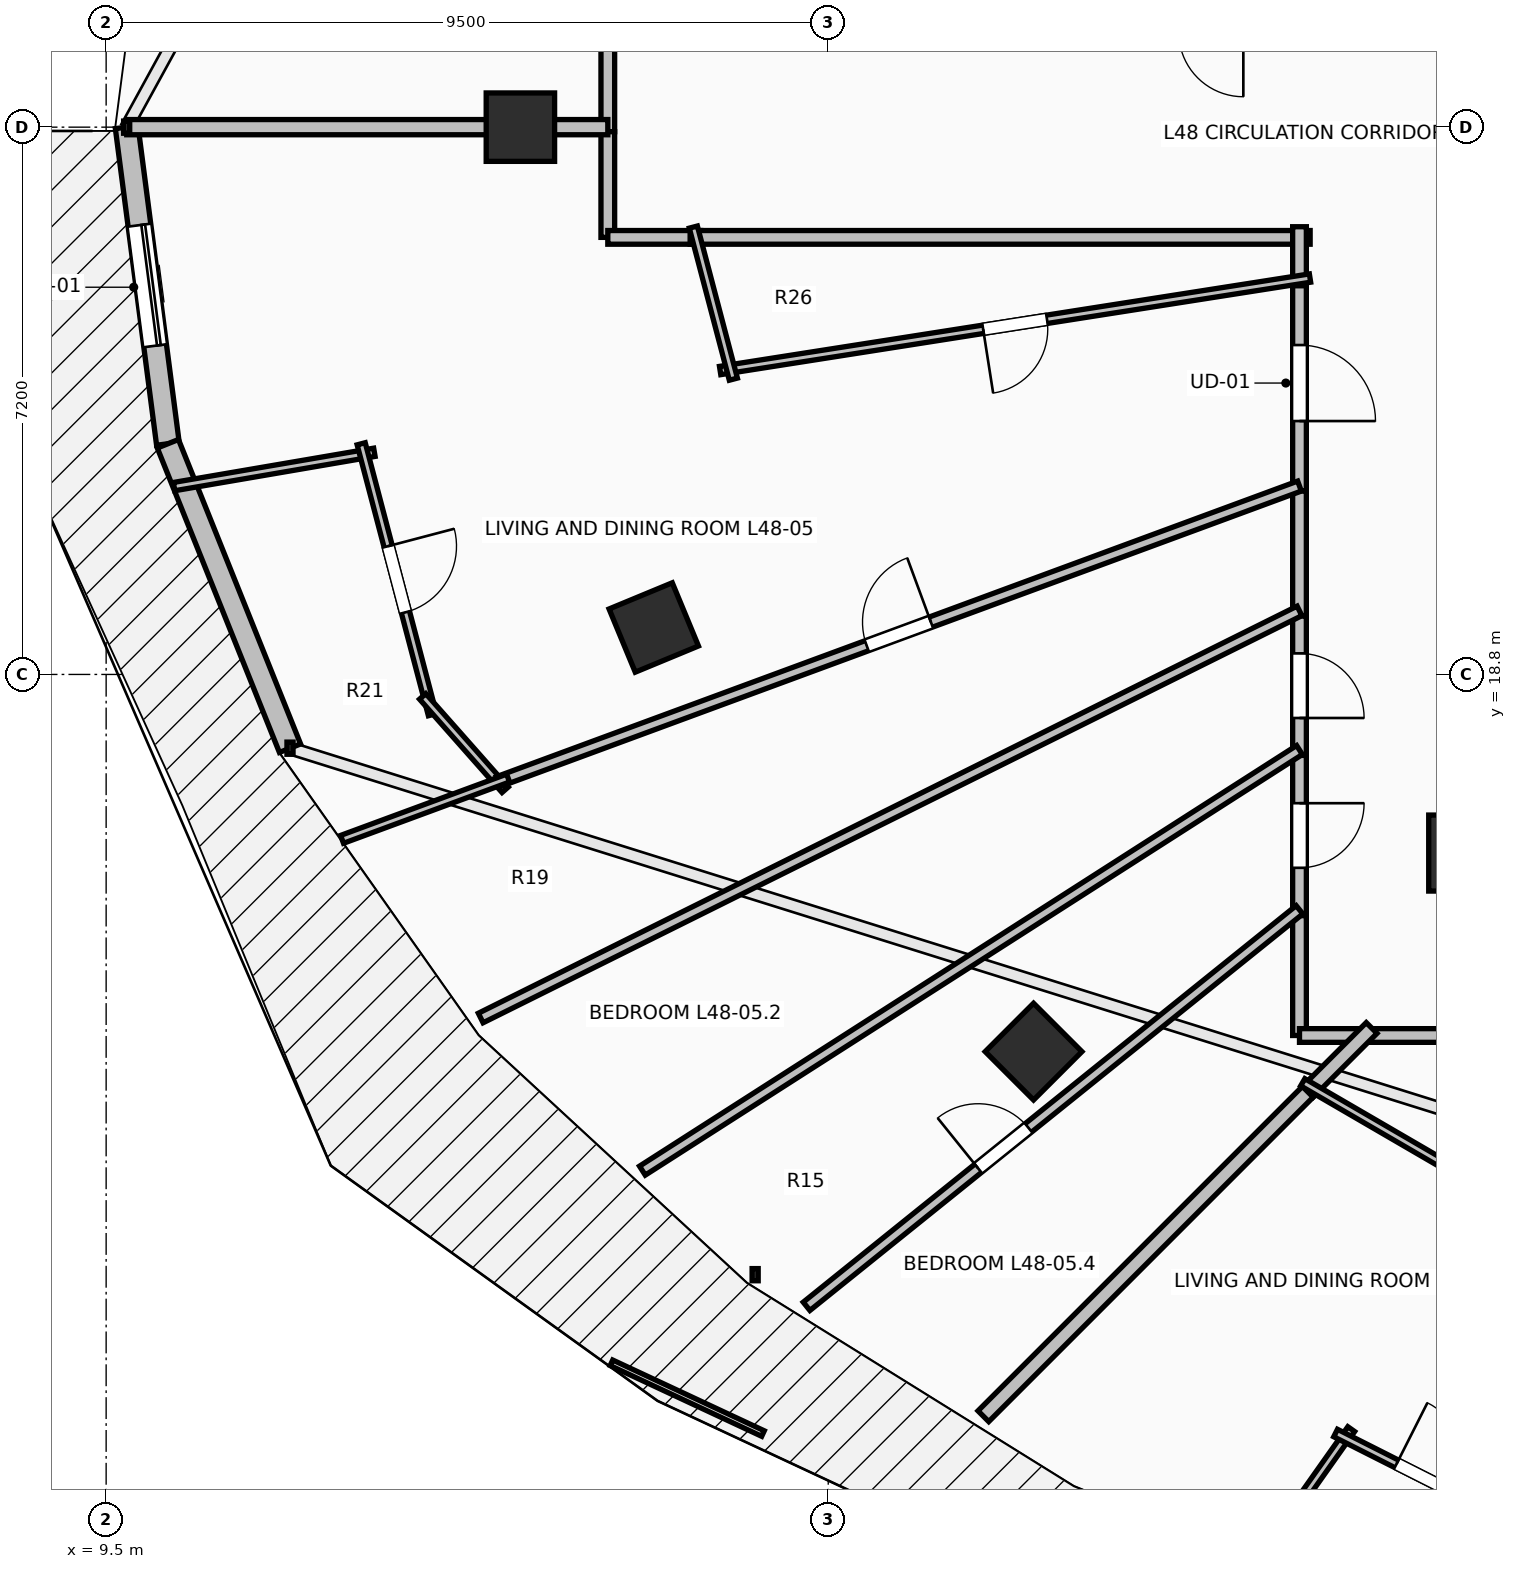
"""IFC4 building model, lengths in metres.
Left out: names, types, materials, properties, quantities, classifications, styles, units other than length and angle.
Written with IfcOpenShell. Run it as: python <this file> out.ifc"""

import sys

from ifc_helpers import new_model, si_unit, direction, frame, frame_2d, origin, origin_2d, place, context, subcontext, project, spatial, rectangle, extrude, element, fill, save


model = new_model("IFC4")
c1 = context("Model", 3, precision=1e-05, world=origin(), true_north=direction((0.0, 1.0)))
c2 = subcontext(c1, "Body", "Model", "MODEL_VIEW")
j1 = project(units=[si_unit("LENGTHUNIT", "METRE"), si_unit("PLANEANGLEUNIT", "RADIAN")], contexts=[c1])
p1 = place(None, origin())
s1 = spatial("IfcSite", under=j1, at=p1, CompositionType="ELEMENT")
p2 = place(p1, origin())
s2 = spatial("IfcBuilding", under=s1, at=p2, CompositionType="ELEMENT")
p3 = place(p2, frame((0.0, 0.0, 179.1)))
s3 = spatial("IfcBuildingStorey", under=s2, at=p3, CompositionType="ELEMENT", Elevation=179.1)
for number, where, z_axis, x_axis in (
    (1, (14.95, 26.0, 0.0), (0.0, 0.0, 1.0), (-1.0, 0.0, 0.0)),
    (2, (16.705, 19.418, 0.0), (0.0, 0.0, 1.0), (-0.924, -0.383, 0.0)),
    (3, (21.701, 13.838, 0.0), (0.0, 0.0, 1.0), (-0.707, -0.707, 0.0)),
):
    element("IfcColumn", number, at=place(p3, frame(where, z_axis=z_axis, x_axis=x_axis)), inside=s3, PredefinedType="COLUMN", context=c2, shape_type="SweptSolid", body=[
        extrude(rectangle(XDim=0.9, YDim=0.9, at=origin_2d()), origin(), (0.0, 0.0, 1.0), 3.5),
    ])
p4 = place(p3, frame((27.25, 16.45, 0.0), z_axis=(0.0, 0.0, 1.0), x_axis=(1.0, 0.0, 0.0)))
e4 = element("IfcColumn", 4, at=p4, inside=s3, PredefinedType="PILASTER", context=c2, shape_type="SweptSolid", body=[
    extrude(rectangle(XDim=0.7, YDim=1.0, at=origin_2d()), origin(), (0.0, 0.0, 1.0), 3.5),
])
p5 = place(p3, frame((9.77, 26.0, 0.0), z_axis=(0.0, 0.0, 1.0), x_axis=(0.129147853268, -0.991625348605, 0.0)))
e5 = element("IfcWall", 5, at=p5, inside=s3, PredefinedType="STANDARD", context=c2, shape_type="SweptSolid", body=[
    extrude(rectangle(XDim=4.2, YDim=0.3, at=frame_2d((2.1, 0.0))), origin(), (0.0, 0.0, 1.0), 3.24),
])
p6 = place(p5, frame((1.3, 0.0, 0.0)))
e6 = element("IfcOpeningElement", 6, at=p6, cuts=e5, PredefinedType="OPENING", context=c2, shape_type="SweptSolid", body=[
    extrude(rectangle(XDim=1.6, YDim=2.3, at=frame_2d((0.8, 1.15))), frame((0.0, 0.165, 0.0), z_axis=(0.0, -1.0, 0.0), x_axis=(1.0, 0.0, 0.0)), (0.0, 0.0, 1.0), 0.33),
])
p7 = place(p3, frame((10.312, 21.835, 0.0), z_axis=(0.0, 0.0, 1.0), x_axis=(0.372268409848, -0.928125116043, 0.0)))
e7 = element("IfcWall", 7, at=p7, inside=s3, PredefinedType="STANDARD", context=c2, shape_type="SweptSolid", body=[
    extrude(rectangle(XDim=4.315, YDim=0.3, at=frame_2d((2.158, 0.0))), origin(), (0.0, 0.0, 1.0), 3.24),
])
p8 = place(p3, frame((16.1, 27.25, 0.0), z_axis=(0.0, 0.0, 1.0), x_axis=(0.0, -1.0, 0.0)))
e8 = element("IfcWall", 8, at=p8, inside=s3, PredefinedType="PARTITIONING", context=c2, shape_type="SweptSolid", body=[
    extrude(rectangle(XDim=1.31, YDim=0.18, at=frame_2d((0.655, 0.0))), origin(), (0.0, 0.0, 1.0), 2.432),
])
p9 = place(p3, frame((16.1, 25.94, 0.0), z_axis=(0.0, 0.0, 1.0), x_axis=(0.0, -1.0, 0.0)))
e9 = element("IfcWall", 9, at=p9, inside=s3, PredefinedType="PARTITIONING", context=c2, shape_type="SweptSolid", body=[
    extrude(rectangle(XDim=1.39, YDim=0.18, at=frame_2d((0.695, 0.0))), origin(), (0.0, 0.0, 1.0), 2.432),
])
p10 = place(p3, frame((16.1, 24.55, 0.0), z_axis=(0.0, 0.0, 1.0), x_axis=(1.0, 0.0, 0.0)))
e10 = element("IfcWall", 10, at=p10, inside=s3, PredefinedType="PARTITIONING", context=c2, shape_type="SweptSolid", body=[
    extrude(rectangle(XDim=1.223, YDim=0.18, at=frame_2d((0.611, 0.0))), origin(), (0.0, 0.0, 1.0), 3.24),
])
p11 = place(p3, frame((25.2, 24.053, 0.0), z_axis=(0.0, 0.0, 1.0), x_axis=(0.0, -1.0, 0.0)))
e11 = element("IfcWall", 11, at=p11, inside=s3, PredefinedType="PARTITIONING", context=c2, shape_type="SweptSolid", body=[
    extrude(rectangle(XDim=2.839, YDim=0.18, at=frame_2d((1.419, 0.0))), origin(), (0.0, 0.0, 1.0), 3.24),
])
p12 = place(p11, frame((0.919, 0.0, 0.0)))
e12 = element("IfcOpeningElement", 12, at=p12, cuts=e11, PredefinedType="OPENING", context=c2, shape_type="SweptSolid", body=[
    extrude(rectangle(XDim=1.0, YDim=2.15, at=frame_2d((0.5, 1.075))), frame((0.0, 0.105, 0.0), z_axis=(0.0, -1.0, 0.0), x_axis=(1.0, 0.0, 0.0)), (0.0, 0.0, 1.0), 0.21),
])
p13 = place(p3, frame((17.183, 24.55, 0.0), z_axis=(0.0, 0.0, 1.0), x_axis=(1.0, 0.0, 0.0)))
e13 = element("IfcWall", 13, at=p13, inside=s3, PredefinedType="PARTITIONING", context=c2, shape_type="SweptSolid", body=[
    extrude(rectangle(XDim=8.157, YDim=0.18, at=frame_2d((4.079, 0.0))), origin(), (0.0, 0.0, 1.0), 2.874),
])
p14 = place(p3, frame((25.2, 24.69, 0.0), z_axis=(0.0, 0.0, 1.0), x_axis=(0.0, -1.0, 0.0)))
e14 = element("IfcWall", 14, at=p14, inside=s3, PredefinedType="PARTITIONING", context=c2, shape_type="SweptSolid", body=[
    extrude(rectangle(XDim=0.777, YDim=0.18, at=frame_2d((0.388, 0.0))), origin(), (0.0, 0.0, 1.0), 3.24),
])
p15 = place(p3, frame((25.2, 21.214, 0.0), z_axis=(0.0, 0.0, 1.0), x_axis=(0.0, -1.0, 0.0)))
e15 = element("IfcWall", 15, at=p15, inside=s3, PredefinedType="PARTITIONING", context=c2, shape_type="SweptSolid", body=[
    extrude(rectangle(XDim=1.645, YDim=0.18, at=frame_2d((0.823, 0.0))), origin(), (0.0, 0.0, 1.0), 3.24),
])
p16 = place(p3, frame((25.2, 19.569, 0.0), z_axis=(0.0, 0.0, 1.0), x_axis=(0.0, -1.0, 0.0)))
e16 = element("IfcWall", 16, at=p16, inside=s3, PredefinedType="PARTITIONING", context=c2, shape_type="SweptSolid", body=[
    extrude(rectangle(XDim=1.834, YDim=0.18, at=frame_2d((0.917, 0.0))), origin(), (0.0, 0.0, 1.0), 3.24),
])
p17 = place(p16, frame((0.492, 0.0, 0.0)))
e17 = element("IfcOpeningElement", 17, at=p17, cuts=e16, PredefinedType="OPENING", context=c2, shape_type="SweptSolid", body=[
    extrude(rectangle(XDim=0.85, YDim=2.1, at=frame_2d((0.425, 1.05))), frame((0.0, 0.105, 0.0), z_axis=(0.0, -1.0, 0.0), x_axis=(1.0, 0.0, 0.0)), (0.0, 0.0, 1.0), 0.21),
])
p18 = place(p3, frame((25.2, 17.735, 0.0), z_axis=(0.0, 0.0, 1.0), x_axis=(0.0, -1.0, 0.0)))
e18 = element("IfcWall", 18, at=p18, inside=s3, PredefinedType="PARTITIONING", context=c2, shape_type="SweptSolid", body=[
    extrude(rectangle(XDim=2.108, YDim=0.18, at=frame_2d((1.054, 0.0))), origin(), (0.0, 0.0, 1.0), 2.432),
])
p19 = place(p18, frame((0.629, 0.0, 0.0)))
e19 = element("IfcOpeningElement", 19, at=p19, cuts=e18, PredefinedType="OPENING", context=c2, shape_type="SweptSolid", body=[
    extrude(rectangle(XDim=0.85, YDim=2.1, at=frame_2d((0.425, 1.05))), frame((0.0, 0.105, 0.0), z_axis=(0.0, -1.0, 0.0), x_axis=(1.0, 0.0, 0.0)), (0.0, 0.0, 1.0), 0.21),
])
p20 = place(p3, frame((25.2, 15.627, 0.0), z_axis=(0.0, 0.0, 1.0), x_axis=(0.0, -1.0, 0.0)))
e20 = element("IfcWall", 20, at=p20, inside=s3, PredefinedType="PARTITIONING", context=c2, shape_type="SweptSolid", body=[
    extrude(rectangle(XDim=1.577, YDim=0.18, at=frame_2d((0.789, 0.0))), origin(), (0.0, 0.0, 1.0), 2.432),
])
p21 = place(p3, frame((25.2, 14.05, 0.0), z_axis=(0.0, 0.0, 1.0), x_axis=(1.0, 0.0, 0.0)))
e21 = element("IfcWall", 21, at=p21, inside=s3, PredefinedType="PARTITIONING", context=c2, shape_type="SweptSolid", body=[
    extrude(rectangle(XDim=0.91, YDim=0.18, at=frame_2d((0.455, 0.0))), origin(), (0.0, 0.0, 1.0), 2.874),
])
p22 = place(p3, frame((25.97, 14.05, 0.0), z_axis=(0.0, 0.0, 1.0), x_axis=(1.0, 0.0, 0.0)))
e22 = element("IfcWall", 22, at=p22, inside=s3, PredefinedType="PARTITIONING", context=c2, shape_type="SweptSolid", body=[
    extrude(rectangle(XDim=3.385, YDim=0.18, at=frame_2d((1.692, 0.0))), origin(), (0.0, 0.0, 1.0), 2.432),
])
p23 = place(p3, frame((9.771, 26.0, 0.0), z_axis=(0.0, 0.0, 1.0), x_axis=(1.0, 0.0, 0.0)))
e23 = element("IfcWall", 23, at=p23, inside=s3, PredefinedType="PARTITIONING", context=c2, shape_type="SweptSolid", body=[
    extrude(rectangle(XDim=6.329, YDim=0.2, at=frame_2d((3.165, 0.0))), origin(), (0.0, 0.0, 1.0), 2.432),
])
p24 = place(p3, frame((25.338, 24.015, 0.0), z_axis=(0.0, 0.0, 1.0), x_axis=(-0.987940229144, -0.154835731144, 0.0)))
e24 = element("IfcWall", 24, at=p24, inside=s3, PredefinedType="PARTITIONING", context=c2, shape_type="SweptSolid", body=[
    extrude(rectangle(XDim=7.855, YDim=0.11, at=frame_2d((3.928, 0.0))), origin(), (0.0, 0.0, 1.0), 2.874),
])
p25 = place(p24, frame((3.503, 0.0, 0.0)))
e25 = element("IfcOpeningElement", 25, at=p25, cuts=e24, PredefinedType="OPENING", context=c2, shape_type="SweptSolid", body=[
    extrude(rectangle(XDim=0.85, YDim=2.1, at=frame_2d((0.425, 1.05))), frame((0.0, 0.07, 0.0), z_axis=(0.0, -1.0, 0.0), x_axis=(1.0, 0.0, 0.0)), (0.0, 0.0, 1.0), 0.14),
])
p26 = place(p3, frame((17.752, 22.685, 0.0), z_axis=(0.0, 0.0, 1.0), x_axis=(-0.254429402158, 0.967091350038, 0.0)))
e26 = element("IfcWall", 26, at=p26, inside=s3, PredefinedType="PARTITIONING", context=c2, shape_type="SweptSolid", body=[
    extrude(rectangle(XDim=2.069, YDim=0.11, at=frame_2d((1.034, 0.0))), origin(), (0.0, 0.0, 1.0), 3.24),
])
p27 = place(p3, frame((10.394, 21.271, 0.0), z_axis=(0.0, 0.0, 1.0), x_axis=(0.985656128296, 0.168766100722, 0.0)))
e27 = element("IfcWall", 27, at=p27, inside=s3, PredefinedType="PARTITIONING", context=c2, shape_type="SweptSolid", body=[
    extrude(rectangle(XDim=2.673, YDim=0.11, at=frame_2d((1.337, 0.0))), origin(), (0.0, 0.0, 1.0), 3.24),
])
p28 = place(p3, frame((12.855, 21.834, 0.0), z_axis=(0.0, 0.0, 1.0), x_axis=(0.254271540361, -0.967132867688, 0.0)))
e28 = element("IfcWall", 28, at=p28, inside=s3, PredefinedType="PARTITIONING", context=c2, shape_type="SweptSolid", body=[
    extrude(rectangle(XDim=3.685, YDim=0.11, at=frame_2d((1.843, 0.0))), origin(), (0.0, 0.0, 1.0), 3.24),
])
p29 = place(p28, frame((1.393, 0.0, 0.0)))
e29 = element("IfcOpeningElement", 29, at=p29, cuts=e28, PredefinedType="OPENING", context=c2, shape_type="SweptSolid", body=[
    extrude(rectangle(XDim=0.9, YDim=2.1, at=frame_2d((0.45, 1.05))), frame((0.0, 0.07, 0.0), z_axis=(0.0, -1.0, 0.0), x_axis=(1.0, 0.0, 0.0)), (0.0, 0.0, 1.0), 0.14),
])
p30 = place(p3, frame((13.664, 18.511, 0.0), z_axis=(0.0, 0.0, 1.0), x_axis=(0.662345628205, -0.749198417509, 0.0)))
e30 = element("IfcWall", 30, at=p30, inside=s3, PredefinedType="PARTITIONING", context=c2, shape_type="SweptSolid", body=[
    extrude(rectangle(XDim=1.639, YDim=0.11, at=frame_2d((0.819, 0.0))), origin(), (0.0, 0.0, 1.0), 3.24),
])
p31 = place(p3, frame((14.657, 17.388, 0.0), z_axis=(0.0, 0.0, 1.0), x_axis=(0.938173124492, 0.346166417322, 0.0)))
e31 = element("IfcWall", 31, at=p31, inside=s3, PredefinedType="PARTITIONING", context=c2, shape_type="SweptSolid", body=[
    extrude(rectangle(XDim=11.238, YDim=0.14, at=frame_2d((5.619, 0.0))), origin(), (0.0, 0.0, 1.0), 2.432),
])
p32 = place(p31, frame((5.169, 0.0, 0.0)))
e32 = element("IfcOpeningElement", 32, at=p32, cuts=e31, PredefinedType="OPENING", context=c2, shape_type="SweptSolid", body=[
    extrude(rectangle(XDim=0.9, YDim=2.1, at=frame_2d((0.45, 1.05))), frame((0.0, 0.085, 0.0), z_axis=(0.0, -1.0, 0.0), x_axis=(1.0, 0.0, 0.0)), (0.0, 0.0, 1.0), 0.17),
])
p33 = place(p3, frame((12.604, 16.631, 0.0), z_axis=(0.0, 0.0, 1.0), x_axis=(0.938194450562, 0.346108614361, 0.0)))
e33 = element("IfcWall", 33, at=p33, inside=s3, PredefinedType="PARTITIONING", context=c2, shape_type="SweptSolid", body=[
    extrude(rectangle(XDim=2.328, YDim=0.11, at=frame_2d((1.164, 0.0))), origin(), (0.0, 0.0, 1.0), 3.24),
])
p34 = place(p3, frame((14.428, 14.28, 0.0), z_axis=(0.0, 0.0, 1.0), x_axis=(0.895423439435, 0.44521552546, 0.0)))
e34 = element("IfcWall", 34, at=p34, inside=s3, PredefinedType="PARTITIONING", context=c2, shape_type="SweptSolid", body=[
    extrude(rectangle(XDim=12.03, YDim=0.14, at=frame_2d((6.015, 0.0))), origin(), (0.0, 0.0, 1.0), 2.432),
])
p35 = place(p3, frame((16.555, 12.272, 0.0), z_axis=(0.0, 0.0, 1.0), x_axis=(0.842221721565, 0.539131312135, 0.0)))
e35 = element("IfcWall", 35, at=p35, inside=s3, PredefinedType="PARTITIONING", context=c2, shape_type="SweptSolid", body=[
    extrude(rectangle(XDim=10.265, YDim=0.14, at=frame_2d((5.132, 0.0))), origin(), (0.0, 0.0, 1.0), 2.432),
])
p36 = place(p3, frame((18.715, 10.487, 0.0), z_axis=(0.0, 0.0, 1.0), x_axis=(0.779157389419, 0.626828335762, 0.0)))
e36 = element("IfcWall", 36, at=p36, inside=s3, PredefinedType="PARTITIONING", context=c2, shape_type="SweptSolid", body=[
    extrude(rectangle(XDim=8.323, YDim=0.14, at=frame_2d((4.162, 0.0))), origin(), (0.0, 0.0, 1.0), 2.432),
])
p37 = place(p36, frame((2.896, 0.0, 0.0)))
e37 = element("IfcOpeningElement", 37, at=p37, cuts=e36, PredefinedType="OPENING", context=c2, shape_type="SweptSolid", body=[
    extrude(rectangle(XDim=0.85, YDim=2.1, at=frame_2d((0.425, 1.05))), frame((0.0, 0.085, 0.0), z_axis=(0.0, -1.0, 0.0), x_axis=(1.0, 0.0, 0.0)), (0.0, 0.0, 1.0), 0.17),
])
p38 = place(p3, frame((21.041, 9.041, 0.0), z_axis=(0.0, 0.0, 1.0), x_axis=(0.707106781187, 0.707106781187, 0.0)))
e38 = element("IfcWall", 38, at=p38, inside=s3, PredefinedType="PARTITIONING", context=c2, shape_type="SweptSolid", body=[
    extrude(rectangle(XDim=6.176, YDim=0.2, at=frame_2d((3.088, 0.0))), origin(), (0.0, 0.0, 1.0), 2.774),
])
p39 = place(p3, frame((25.309, 13.309, 0.0), z_axis=(0.0, 0.0, 1.0), x_axis=(0.707106781187, 0.707106781187, 0.0)))
e39 = element("IfcWall", 39, at=p39, inside=s3, PredefinedType="PARTITIONING", context=c2, shape_type="SweptSolid", body=[
    extrude(rectangle(XDim=1.188, YDim=0.2, at=frame_2d((0.594, 0.0))), origin(), (0.0, 0.0, 1.0), 2.874),
])
p40 = place(p3, frame((27.568, 12.083, 0.0), z_axis=(0.0, 0.0, 1.0), x_axis=(-0.864515441931, 0.502606258082, 0.0)))
e40 = element("IfcWall", 40, at=p40, inside=s3, PredefinedType="PARTITIONING", context=c2, shape_type="SweptSolid", body=[
    extrude(rectangle(XDim=2.69, YDim=0.11, at=frame_2d((1.345, 0.0))), origin(), (0.0, 0.0, 1.0), 3.24),
])
p41 = place(p3, frame((24.666, 7.154, 0.0), z_axis=(0.0, 0.0, 1.0), x_axis=(0.577389248155, 0.816469017241, 0.0)))
e41 = element("IfcWall", 41, at=p41, inside=s3, PredefinedType="PARTITIONING", context=c2, shape_type="SweptSolid", body=[
    extrude(rectangle(XDim=2.104, YDim=0.11, at=frame_2d((1.052, 0.0))), origin(), (0.0, 0.0, 1.0), 3.24),
])
p42 = place(p3, frame((25.675, 8.82, 0.0), z_axis=(0.0, 0.0, 1.0), x_axis=(0.892628057427, -0.450793911999, 0.0)))
e42 = element("IfcWall", 42, at=p42, inside=s3, PredefinedType="PARTITIONING", context=c2, shape_type="SweptSolid", body=[
    extrude(rectangle(XDim=2.698, YDim=0.11, at=frame_2d((1.349, 0.0))), origin(), (0.0, 0.0, 1.0), 3.24),
])
p43 = place(p42, frame((0.899, 0.0, 0.0)))
e43 = element("IfcOpeningElement", 43, at=p43, cuts=e42, PredefinedType="OPENING", context=c2, shape_type="SweptSolid", body=[
    extrude(rectangle(XDim=0.9, YDim=2.1, at=frame_2d((0.45, 1.05))), frame((0.0, 0.07, 0.0), z_axis=(0.0, -1.0, 0.0), x_axis=(1.0, 0.0, 0.0)), (0.0, 0.0, 1.0), 0.14),
])
p44 = place(p6, origin())
e44 = element("IfcDoor", 44, at=p44, inside=s3, OperationType="SLIDING_TO_LEFT", PredefinedType="DOOR", context=c2, shape_type="SweptSolid", body=[
    extrude(rectangle(XDim=1.6, YDim=2.3, at=frame_2d((0.8, 1.15))), frame((0.0, 0.025, 0.0), z_axis=(0.0, -1.0, 0.0), x_axis=(1.0, 0.0, 0.0)), (0.0, 0.0, 1.0), 0.05),
])
fill(e6, e44)
p45 = place(p12, origin())
e45 = element("IfcDoor", 45, at=p45, inside=s3, OperationType="SINGLE_SWING_RIGHT", PredefinedType="DOOR", context=c2, shape_type="SweptSolid", body=[
    extrude(rectangle(XDim=1.0, YDim=2.15, at=frame_2d((0.5, 1.075))), frame((0.0, 0.025, 0.0), z_axis=(0.0, -1.0, 0.0), x_axis=(1.0, 0.0, 0.0)), (0.0, 0.0, 1.0), 0.05),
])
fill(e12, e45)
p46 = place(p25, origin())
e46 = element("IfcDoor", 46, at=p46, inside=s3, OperationType="SINGLE_SWING_RIGHT", PredefinedType="DOOR", context=c2, shape_type="SweptSolid", body=[
    extrude(rectangle(XDim=0.85, YDim=2.1, at=frame_2d((0.425, 1.05))), frame((0.0, 0.025, 0.0), z_axis=(0.0, -1.0, 0.0), x_axis=(1.0, 0.0, 0.0)), (0.0, 0.0, 1.0), 0.05),
])
fill(e25, e46)
p47 = place(p29, origin())
e47 = element("IfcDoor", 47, at=p47, inside=s3, OperationType="SINGLE_SWING_LEFT", PredefinedType="DOOR", context=c2, shape_type="SweptSolid", body=[
    extrude(rectangle(XDim=0.9, YDim=2.1, at=frame_2d((0.45, 1.05))), frame((0.0, 0.025, 0.0), z_axis=(0.0, -1.0, 0.0), x_axis=(1.0, 0.0, 0.0)), (0.0, 0.0, 1.0), 0.05),
])
fill(e29, e47)
p48 = place(p32, origin())
e48 = element("IfcDoor", 48, at=p48, inside=s3, OperationType="SINGLE_SWING_RIGHT", PredefinedType="DOOR", context=c2, shape_type="SweptSolid", body=[
    extrude(rectangle(XDim=0.9, YDim=2.1, at=frame_2d((0.45, 1.05))), frame((0.0, 0.025, 0.0), z_axis=(0.0, -1.0, 0.0), x_axis=(1.0, 0.0, 0.0)), (0.0, 0.0, 1.0), 0.05),
])
fill(e32, e48)
p49 = place(p43, origin())
e49 = element("IfcDoor", 49, at=p49, inside=s3, OperationType="SINGLE_SWING_LEFT", PredefinedType="DOOR", context=c2, shape_type="SweptSolid", body=[
    extrude(rectangle(XDim=0.9, YDim=2.1, at=frame_2d((0.45, 1.05))), frame((0.0, 0.025, 0.0), z_axis=(0.0, -1.0, 0.0), x_axis=(1.0, 0.0, 0.0)), (0.0, 0.0, 1.0), 0.05),
])
fill(e43, e49)
p50 = place(p17, origin())
e50 = element("IfcDoor", 50, at=p50, inside=s3, OperationType="SINGLE_SWING_RIGHT", PredefinedType="DOOR", context=c2, shape_type="SweptSolid", body=[
    extrude(rectangle(XDim=0.85, YDim=2.1, at=frame_2d((0.425, 1.05))), frame((0.0, 0.025, 0.0), z_axis=(0.0, -1.0, 0.0), x_axis=(1.0, 0.0, 0.0)), (0.0, 0.0, 1.0), 0.05),
])
fill(e17, e50)
p51 = place(p19, origin())
e51 = element("IfcDoor", 51, at=p51, inside=s3, OperationType="SINGLE_SWING_LEFT", PredefinedType="DOOR", context=c2, shape_type="SweptSolid", body=[
    extrude(rectangle(XDim=0.85, YDim=2.1, at=frame_2d((0.425, 1.05))), frame((0.0, 0.025, 0.0), z_axis=(0.0, -1.0, 0.0), x_axis=(1.0, 0.0, 0.0)), (0.0, 0.0, 1.0), 0.05),
])
fill(e19, e51)
p52 = place(p37, origin())
e52 = element("IfcDoor", 52, at=p52, inside=s3, OperationType="SINGLE_SWING_LEFT", PredefinedType="DOOR", context=c2, shape_type="SweptSolid", body=[
    extrude(rectangle(XDim=0.85, YDim=2.1, at=frame_2d((0.425, 1.05))), frame((0.0, 0.025, 0.0), z_axis=(0.0, -1.0, 0.0), x_axis=(1.0, 0.0, 0.0)), (0.0, 0.0, 1.0), 0.05),
])
fill(e37, e52)
save(model, sys.argv[1])
